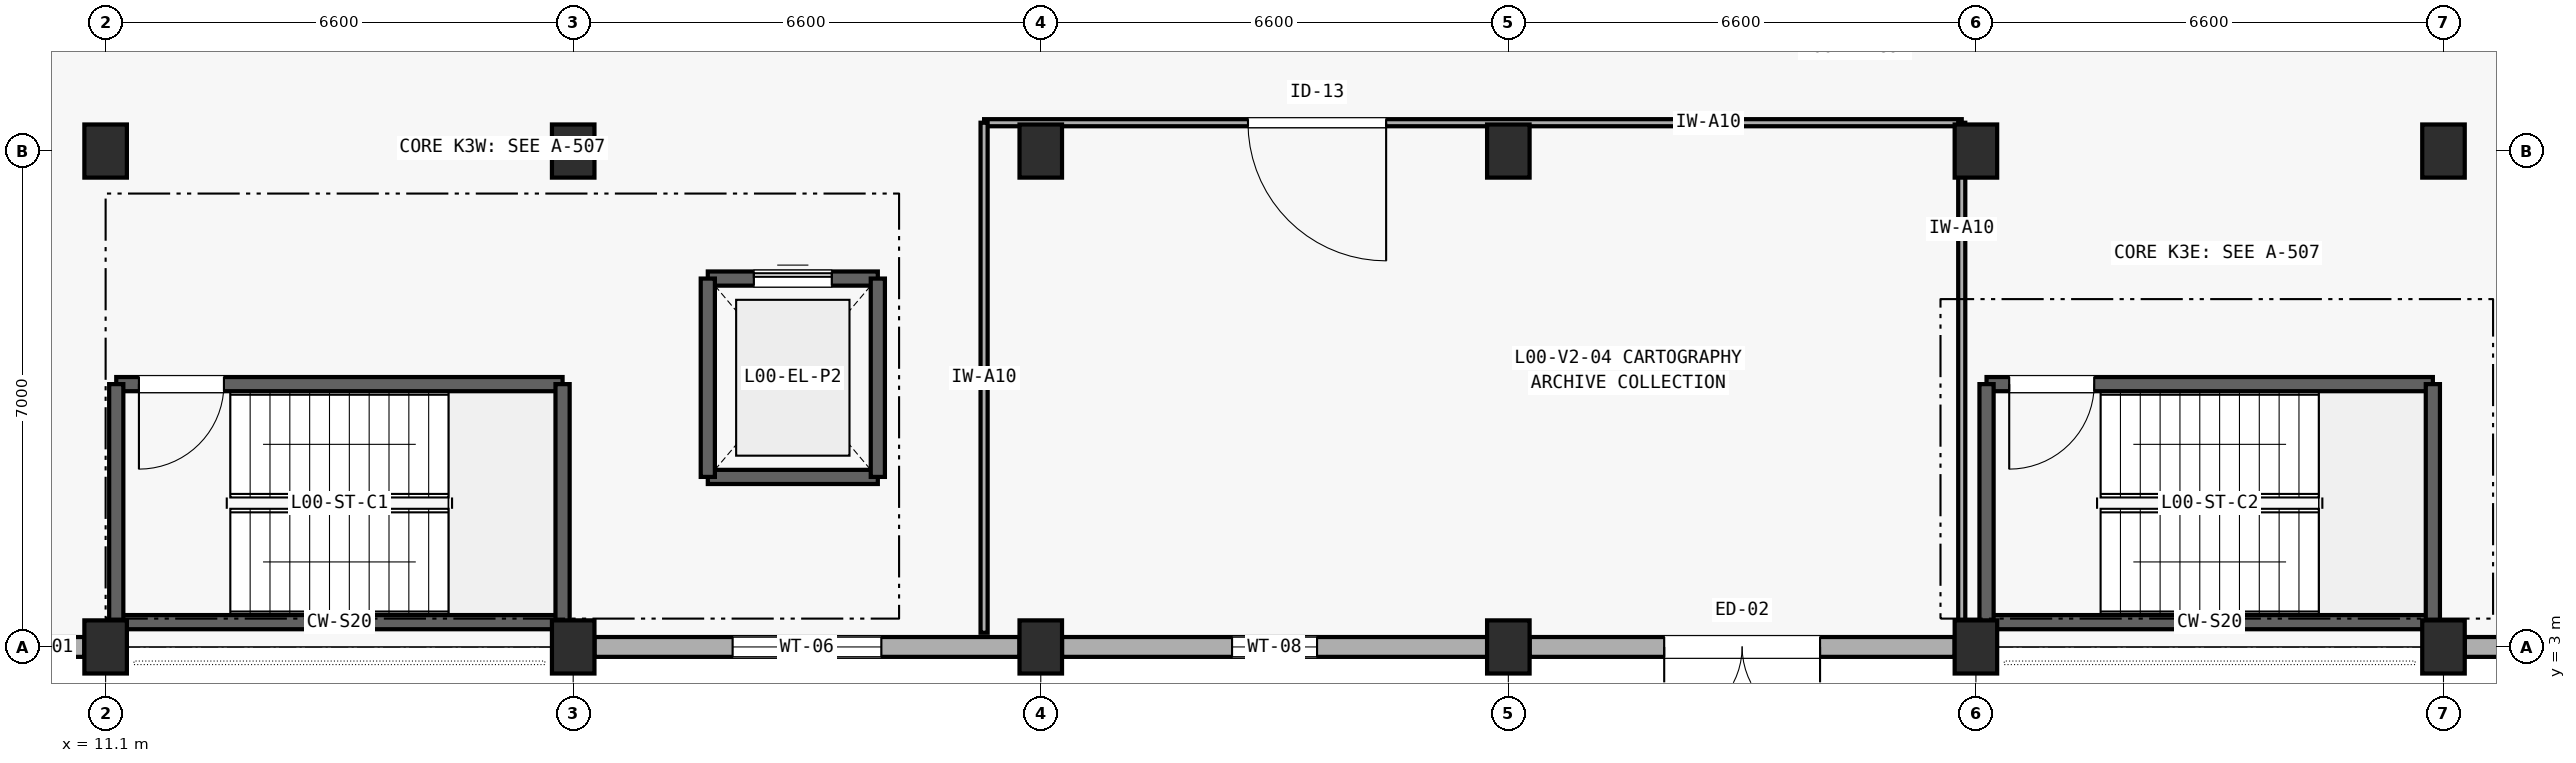
"""IFC4 building model, lengths in metres.
Left out: names, types, materials, properties, quantities, classifications, styles, units other than length and angle.
Written with IfcOpenShell. Run it as: python <this file> out.ifc"""

import sys

from ifc_helpers import new_model, si_unit, direction, frame, frame_2d, origin, origin_2d, place, context, subcontext, project, spatial, rectangle, extrude, element, fill, save


model = new_model("IFC4")
c1 = context("Model", 3, precision=1e-05, world=origin(), true_north=direction((0.0, 1.0)))
c2 = subcontext(c1, "Body", "Model", "MODEL_VIEW")
j1 = project(units=[si_unit("LENGTHUNIT", "METRE"), si_unit("PLANEANGLEUNIT", "RADIAN")], contexts=[c1])
p1 = place(None, origin())
s1 = spatial("IfcSite", under=j1, at=p1, CompositionType="ELEMENT")
p2 = place(p1, origin())
s2 = spatial("IfcBuilding", under=s1, at=p2, CompositionType="ELEMENT")
p3 = place(p2, origin())
s3 = spatial("IfcBuildingStorey", under=s2, at=p3, CompositionType="ELEMENT", Elevation=0.0)
for number, where, z_axis, x_axis in (
    (1, (11.1, 3.0, 0.0), (0.0, 0.0, 1.0), (1.0, 0.0, 0.0)),
    (2, (11.1, 10.0, 0.0), (0.0, 0.0, 1.0), (1.0, 0.0, 0.0)),
    (3, (17.7, 3.0, 0.0), (0.0, 0.0, 1.0), (1.0, 0.0, 0.0)),
    (4, (17.7, 10.0, 0.0), (0.0, 0.0, 1.0), (1.0, 0.0, 0.0)),
    (5, (24.3, 3.0, 0.0), (0.0, 0.0, 1.0), (1.0, 0.0, 0.0)),
    (6, (24.3, 10.0, 0.0), (0.0, 0.0, 1.0), (1.0, 0.0, 0.0)),
    (7, (30.9, 3.0, 0.0), (0.0, 0.0, 1.0), (1.0, 0.0, 0.0)),
    (8, (30.9, 10.0, 0.0), (0.0, 0.0, 1.0), (1.0, 0.0, 0.0)),
    (9, (37.5, 3.0, 0.0), (0.0, 0.0, 1.0), (1.0, 0.0, 0.0)),
    (10, (37.5, 10.0, 0.0), (0.0, 0.0, 1.0), (1.0, 0.0, 0.0)),
    (11, (44.1, 3.0, 0.0), (0.0, 0.0, 1.0), (1.0, 0.0, 0.0)),
    (12, (44.1, 10.0, 0.0), (0.0, 0.0, 1.0), (1.0, 0.0, 0.0)),
):
    element("IfcColumn", number, at=place(p3, frame(where, z_axis=z_axis, x_axis=x_axis)), inside=s3, PredefinedType="COLUMN", context=c2, shape_type="SweptSolid", body=[
        extrude(rectangle(XDim=0.6, YDim=0.75, at=origin_2d()), origin(), (0.0, 0.0, 1.0), 4.2),
    ])
p4 = place(p3, frame((4.8, 3.0, 0.0), z_axis=(0.0, 0.0, 1.0), x_axis=(1.0, 0.0, 0.0)))
e13 = element("IfcWall", 13, at=p4, inside=s3, PredefinedType="SOLIDWALL", context=c2, shape_type="SweptSolid", body=[
    extrude(rectangle(XDim=6.0, YDim=0.28, at=frame_2d((3.0, 0.0))), origin(), (0.0, 0.0, 1.0), 3.345),
])
p5 = place(p4, frame((2.05, 0.0, 0.0)))
e14 = element("IfcOpeningElement", 14, at=p5, cuts=e13, PredefinedType="OPENING", context=c2, shape_type="SweptSolid", body=[
    extrude(rectangle(XDim=1.9, YDim=2.2, at=frame_2d((0.95, 1.1))), frame((0.0, 0.15, 0.0), z_axis=(0.0, -1.0, 0.0), x_axis=(1.0, 0.0, 0.0)), (0.0, 0.0, 1.0), 0.3),
])
p6 = place(p3, frame((18.0, 3.0, 0.0), z_axis=(0.0, 0.0, 1.0), x_axis=(1.0, 0.0, 0.0)))
e15 = element("IfcWall", 15, at=p6, inside=s3, PredefinedType="SOLIDWALL", context=c2, shape_type="SweptSolid", body=[
    extrude(rectangle(XDim=6.0, YDim=0.28, at=frame_2d((3.0, 0.0))), origin(), (0.0, 0.0, 1.0), 3.235),
])
p7 = place(p6, frame((1.95, 0.0, 0.85)))
e16 = element("IfcOpeningElement", 16, at=p7, cuts=e15, PredefinedType="OPENING", context=c2, shape_type="SweptSolid", body=[
    extrude(rectangle(XDim=2.1, YDim=1.35, at=frame_2d((1.05, 0.675))), frame((0.0, 0.15, 0.0), z_axis=(0.0, -1.0, 0.0), x_axis=(1.0, 0.0, 0.0)), (0.0, 0.0, 1.0), 0.3),
])
p8 = place(p3, frame((24.6, 3.0, 0.0), z_axis=(0.0, 0.0, 1.0), x_axis=(1.0, 0.0, 0.0)))
e17 = element("IfcWall", 17, at=p8, inside=s3, PredefinedType="SOLIDWALL", context=c2, shape_type="SweptSolid", body=[
    extrude(rectangle(XDim=6.0, YDim=0.28, at=frame_2d((3.0, 0.0))), origin(), (0.0, 0.0, 1.0), 3.235),
])
p9 = place(p8, frame((2.4, 0.0, 0.85)))
e18 = element("IfcOpeningElement", 18, at=p9, cuts=e17, PredefinedType="OPENING", context=c2, shape_type="SweptSolid", body=[
    extrude(rectangle(XDim=1.2, YDim=1.5, at=frame_2d((0.6, 0.75))), frame((0.0, 0.15, 0.0), z_axis=(0.0, -1.0, 0.0), x_axis=(1.0, 0.0, 0.0)), (0.0, 0.0, 1.0), 0.3),
])
p10 = place(p3, frame((31.2, 3.0, 0.0), z_axis=(0.0, 0.0, 1.0), x_axis=(1.0, 0.0, 0.0)))
e19 = element("IfcWall", 19, at=p10, inside=s3, PredefinedType="SOLIDWALL", context=c2, shape_type="SweptSolid", body=[
    extrude(rectangle(XDim=6.0, YDim=0.28, at=frame_2d((3.0, 0.0))), origin(), (0.0, 0.0, 1.0), 3.285),
])
p11 = place(p10, frame((1.9, 0.0, 0.0)))
e20 = element("IfcOpeningElement", 20, at=p11, cuts=e19, PredefinedType="OPENING", context=c2, shape_type="SweptSolid", body=[
    extrude(rectangle(XDim=2.2, YDim=2.2, at=frame_2d((1.1, 1.1))), frame((0.0, 0.15, 0.0), z_axis=(0.0, -1.0, 0.0), x_axis=(1.0, 0.0, 0.0)), (0.0, 0.0, 1.0), 0.3),
])
p12 = place(p3, frame((44.4, 3.0, 0.0), z_axis=(0.0, 0.0, 1.0), x_axis=(1.0, 0.0, 0.0)))
e21 = element("IfcWall", 21, at=p12, inside=s3, PredefinedType="SOLIDWALL", context=c2, shape_type="SweptSolid", body=[
    extrude(rectangle(XDim=6.0, YDim=0.28, at=frame_2d((3.0, 0.0))), origin(), (0.0, 0.0, 1.0), 3.365),
])
p13 = place(p12, frame((2.05, 0.0, 0.0)))
e22 = element("IfcOpeningElement", 22, at=p13, cuts=e21, PredefinedType="OPENING", context=c2, shape_type="SweptSolid", body=[
    extrude(rectangle(XDim=1.9, YDim=2.2, at=frame_2d((0.95, 1.1))), frame((0.0, 0.15, 0.0), z_axis=(0.0, -1.0, 0.0), x_axis=(1.0, 0.0, 0.0)), (0.0, 0.0, 1.0), 0.3),
])
p14 = place(p3, frame((11.25, 3.35, 0.0), z_axis=(0.0, 0.0, 1.0), x_axis=(1.0, 0.0, 0.0)))
e23 = element("IfcWall", 23, at=p14, inside=s3, PredefinedType="SHEAR", context=c2, shape_type="SweptSolid", body=[
    extrude(rectangle(XDim=6.3, YDim=0.2, at=frame_2d((3.15, 0.0))), origin(), (0.0, 0.0, 1.0), 4.2),
])
p15 = place(p3, frame((11.25, 6.71, 0.0), z_axis=(0.0, 0.0, 1.0), x_axis=(1.0, 0.0, 0.0)))
e24 = element("IfcWall", 24, at=p15, inside=s3, PredefinedType="SHEAR", context=c2, shape_type="SweptSolid", body=[
    extrude(rectangle(XDim=6.3, YDim=0.2, at=frame_2d((3.15, 0.0))), origin(), (0.0, 0.0, 1.0), 4.2),
])
p16 = place(p15, frame((0.32, 0.0, 0.0)))
e25 = element("IfcOpeningElement", 25, at=p16, cuts=e24, PredefinedType="OPENING", context=c2, shape_type="SweptSolid", body=[
    extrude(rectangle(XDim=1.2, YDim=2.15, at=frame_2d((0.6, 1.075))), frame((0.0, 0.11, 0.0), z_axis=(0.0, -1.0, 0.0), x_axis=(1.0, 0.0, 0.0)), (0.0, 0.0, 1.0), 0.22),
])
for number, where, z_axis, x_axis in (
    (26, (11.25, 3.35, 0.0), (0.0, 0.0, 1.0), (0.0, 1.0, 0.0)),
    (27, (17.55, 3.35, 0.0), (0.0, 0.0, 1.0), (0.0, 1.0, 0.0)),
):
    element("IfcWall", number, at=place(p3, frame(where, z_axis=z_axis, x_axis=x_axis)), inside=s3, PredefinedType="SHEAR", context=c2, shape_type="SweptSolid", body=[
        extrude(rectangle(XDim=3.36, YDim=0.2, at=frame_2d((1.68, 0.0))), origin(), (0.0, 0.0, 1.0), 4.2),
    ])
p17 = place(p3, frame((37.65, 3.35, 0.0), z_axis=(0.0, 0.0, 1.0), x_axis=(1.0, 0.0, 0.0)))
e28 = element("IfcWall", 28, at=p17, inside=s3, PredefinedType="SHEAR", context=c2, shape_type="SweptSolid", body=[
    extrude(rectangle(XDim=6.3, YDim=0.2, at=frame_2d((3.15, 0.0))), origin(), (0.0, 0.0, 1.0), 4.2),
])
p18 = place(p3, frame((37.65, 6.71, 0.0), z_axis=(0.0, 0.0, 1.0), x_axis=(1.0, 0.0, 0.0)))
e29 = element("IfcWall", 29, at=p18, inside=s3, PredefinedType="SHEAR", context=c2, shape_type="SweptSolid", body=[
    extrude(rectangle(XDim=6.3, YDim=0.2, at=frame_2d((3.15, 0.0))), origin(), (0.0, 0.0, 1.0), 4.2),
])
p19 = place(p18, frame((0.32, 0.0, 0.0)))
e30 = element("IfcOpeningElement", 30, at=p19, cuts=e29, PredefinedType="OPENING", context=c2, shape_type="SweptSolid", body=[
    extrude(rectangle(XDim=1.2, YDim=2.15, at=frame_2d((0.6, 1.075))), frame((0.0, 0.11, 0.0), z_axis=(0.0, -1.0, 0.0), x_axis=(1.0, 0.0, 0.0)), (0.0, 0.0, 1.0), 0.22),
])
for number, where, z_axis, x_axis in (
    (31, (37.65, 3.35, 0.0), (0.0, 0.0, 1.0), (0.0, 1.0, 0.0)),
    (32, (43.95, 3.35, 0.0), (0.0, 0.0, 1.0), (0.0, 1.0, 0.0)),
):
    element("IfcWall", number, at=place(p3, frame(where, z_axis=z_axis, x_axis=x_axis)), inside=s3, PredefinedType="SHEAR", context=c2, shape_type="SweptSolid", body=[
        extrude(rectangle(XDim=3.36, YDim=0.2, at=frame_2d((1.68, 0.0))), origin(), (0.0, 0.0, 1.0), 4.2),
    ])
p20 = place(p3, frame((19.6, 5.4, 0.0), z_axis=(0.0, 0.0, 1.0), x_axis=(1.0, 0.0, 0.0)))
e33 = element("IfcWall", 33, at=p20, inside=s3, PredefinedType="SHEAR", context=c2, shape_type="SweptSolid", body=[
    extrude(rectangle(XDim=2.4, YDim=0.2, at=frame_2d((1.2, 0.0))), origin(), (0.0, 0.0, 1.0), 4.2),
])
p21 = place(p3, frame((19.6, 8.2, 0.0), z_axis=(0.0, 0.0, 1.0), x_axis=(1.0, 0.0, 0.0)))
e34 = element("IfcWall", 34, at=p21, inside=s3, PredefinedType="SHEAR", context=c2, shape_type="SweptSolid", body=[
    extrude(rectangle(XDim=2.4, YDim=0.2, at=frame_2d((1.2, 0.0))), origin(), (0.0, 0.0, 1.0), 4.2),
])
p22 = place(p21, frame((0.65, 0.0, 0.0)))
e35 = element("IfcOpeningElement", 35, at=p22, cuts=e34, PredefinedType="OPENING", context=c2, shape_type="SweptSolid", body=[
    extrude(rectangle(XDim=1.1, YDim=2.15, at=frame_2d((0.55, 1.075))), frame((0.0, 0.11, 0.0), z_axis=(0.0, -1.0, 0.0), x_axis=(1.0, 0.0, 0.0)), (0.0, 0.0, 1.0), 0.22),
])
for number, where, z_axis, x_axis in (
    (36, (19.6, 5.4, 0.0), (0.0, 0.0, 1.0), (0.0, 1.0, 0.0)),
    (37, (22.0, 5.4, 0.0), (0.0, 0.0, 1.0), (0.0, 1.0, 0.0)),
):
    element("IfcWall", number, at=place(p3, frame(where, z_axis=z_axis, x_axis=x_axis)), inside=s3, PredefinedType="SHEAR", context=c2, shape_type="SweptSolid", body=[
        extrude(rectangle(XDim=2.8, YDim=0.2, at=frame_2d((1.4, 0.0))), origin(), (0.0, 0.0, 1.0), 4.2),
    ])
p23 = place(p3, frame((23.5, 10.4, 0.0), z_axis=(0.0, 0.0, 1.0), x_axis=(1.0, 0.0, 0.0)))
e38 = element("IfcWall", 38, at=p23, inside=s3, PredefinedType="PARTITIONING", context=c2, shape_type="SweptSolid", body=[
    extrude(rectangle(XDim=13.8, YDim=0.1, at=frame_2d((6.9, 0.0))), origin(), (0.0, 0.0, 1.0), 3.9),
])
p24 = place(p23, frame((3.725, 0.0, 0.0)))
e39 = element("IfcOpeningElement", 39, at=p24, cuts=e38, PredefinedType="OPENING", context=c2, shape_type="SweptSolid", body=[
    extrude(rectangle(XDim=1.95, YDim=2.3, at=frame_2d((0.975, 1.15))), frame((0.0, 0.06, 0.0), z_axis=(0.0, -1.0, 0.0), x_axis=(1.0, 0.0, 0.0)), (0.0, 0.0, 1.0), 0.12),
])
for number, where, z_axis, x_axis in (
    (40, (23.5, 3.2, 0.0), (0.0, 0.0, 1.0), (0.0, 1.0, 0.0)),
    (41, (37.3, 3.2, 0.0), (0.0, 0.0, 1.0), (0.0, 1.0, 0.0)),
):
    element("IfcWall", number, at=place(p3, frame(where, z_axis=z_axis, x_axis=x_axis)), inside=s3, PredefinedType="PARTITIONING", context=c2, shape_type="SweptSolid", body=[
        extrude(rectangle(XDim=7.2, YDim=0.1, at=frame_2d((3.6, 0.0))), origin(), (0.0, 0.0, 1.0), 3.9),
    ])
p25 = place(p7, origin())
e42 = element("IfcWindow", 42, at=p25, inside=s3, PartitioningType="SINGLE_PANEL", PredefinedType="WINDOW", context=c2, shape_type="SweptSolid", body=[
    extrude(rectangle(XDim=2.1, YDim=1.35, at=frame_2d((1.05, 0.675))), frame((0.0, 0.03, 0.0), z_axis=(0.0, -1.0, 0.0), x_axis=(1.0, 0.0, 0.0)), (0.0, 0.0, 1.0), 0.06),
])
fill(e16, e42)
p26 = place(p9, origin())
e43 = element("IfcWindow", 43, at=p26, inside=s3, PartitioningType="SINGLE_PANEL", PredefinedType="WINDOW", context=c2, shape_type="SweptSolid", body=[
    extrude(rectangle(XDim=1.2, YDim=1.5, at=frame_2d((0.6, 0.75))), frame((0.0, 0.03, 0.0), z_axis=(0.0, -1.0, 0.0), x_axis=(1.0, 0.0, 0.0)), (0.0, 0.0, 1.0), 0.06),
])
fill(e18, e43)
p27 = place(p11, frame((2.2, 0.0, 0.0), z_axis=(0.0, 0.0, 1.0), x_axis=(-1.0, 0.0, 0.0)))
e44 = element("IfcDoor", 44, at=p27, inside=s3, OperationType="DOUBLE_DOOR_SINGLE_SWING", PredefinedType="DOOR", context=c2, shape_type="SweptSolid", body=[
    extrude(rectangle(XDim=2.2, YDim=2.2, at=frame_2d((1.1, 1.1))), frame((0.0, 0.025, 0.0), z_axis=(0.0, -1.0, 0.0), x_axis=(1.0, 0.0, 0.0)), (0.0, 0.0, 1.0), 0.05),
])
fill(e20, e44)
p28 = place(p16, frame((1.2, 0.0, 0.0), z_axis=(0.0, 0.0, 1.0), x_axis=(-1.0, 0.0, 0.0)))
e45 = element("IfcDoor", 45, at=p28, inside=s3, OperationType="SINGLE_SWING_RIGHT", PredefinedType="DOOR", context=c2, shape_type="SweptSolid", body=[
    extrude(rectangle(XDim=1.2, YDim=2.15, at=frame_2d((0.6, 1.075))), frame((0.0, 0.025, 0.0), z_axis=(0.0, -1.0, 0.0), x_axis=(1.0, 0.0, 0.0)), (0.0, 0.0, 1.0), 0.05),
])
fill(e25, e45)
p29 = place(p19, frame((1.2, 0.0, 0.0), z_axis=(0.0, 0.0, 1.0), x_axis=(-1.0, 0.0, 0.0)))
e46 = element("IfcDoor", 46, at=p29, inside=s3, OperationType="SINGLE_SWING_RIGHT", PredefinedType="DOOR", context=c2, shape_type="SweptSolid", body=[
    extrude(rectangle(XDim=1.2, YDim=2.15, at=frame_2d((0.6, 1.075))), frame((0.0, 0.025, 0.0), z_axis=(0.0, -1.0, 0.0), x_axis=(1.0, 0.0, 0.0)), (0.0, 0.0, 1.0), 0.05),
])
fill(e30, e46)
p30 = place(p22, origin())
e47 = element("IfcDoor", 47, at=p30, inside=s3, OperationType="SLIDING_TO_LEFT", PredefinedType="DOOR", context=c2, shape_type="SweptSolid", body=[
    extrude(rectangle(XDim=1.1, YDim=2.15, at=frame_2d((0.55, 1.075))), frame((0.0, 0.025, 0.0), z_axis=(0.0, -1.0, 0.0), x_axis=(1.0, 0.0, 0.0)), (0.0, 0.0, 1.0), 0.05),
])
fill(e35, e47)
p31 = place(p24, frame((1.95, 0.0, 0.0), z_axis=(0.0, 0.0, 1.0), x_axis=(-1.0, 0.0, 0.0)))
e48 = element("IfcDoor", 48, at=p31, inside=s3, OperationType="SINGLE_SWING_LEFT", PredefinedType="DOOR", context=c2, shape_type="SweptSolid", body=[
    extrude(rectangle(XDim=1.95, YDim=2.3, at=frame_2d((0.975, 1.15))), frame((0.0, 0.025, 0.0), z_axis=(0.0, -1.0, 0.0), x_axis=(1.0, 0.0, 0.0)), (0.0, 0.0, 1.0), 0.05),
])
fill(e39, e48)
save(model, sys.argv[1])
